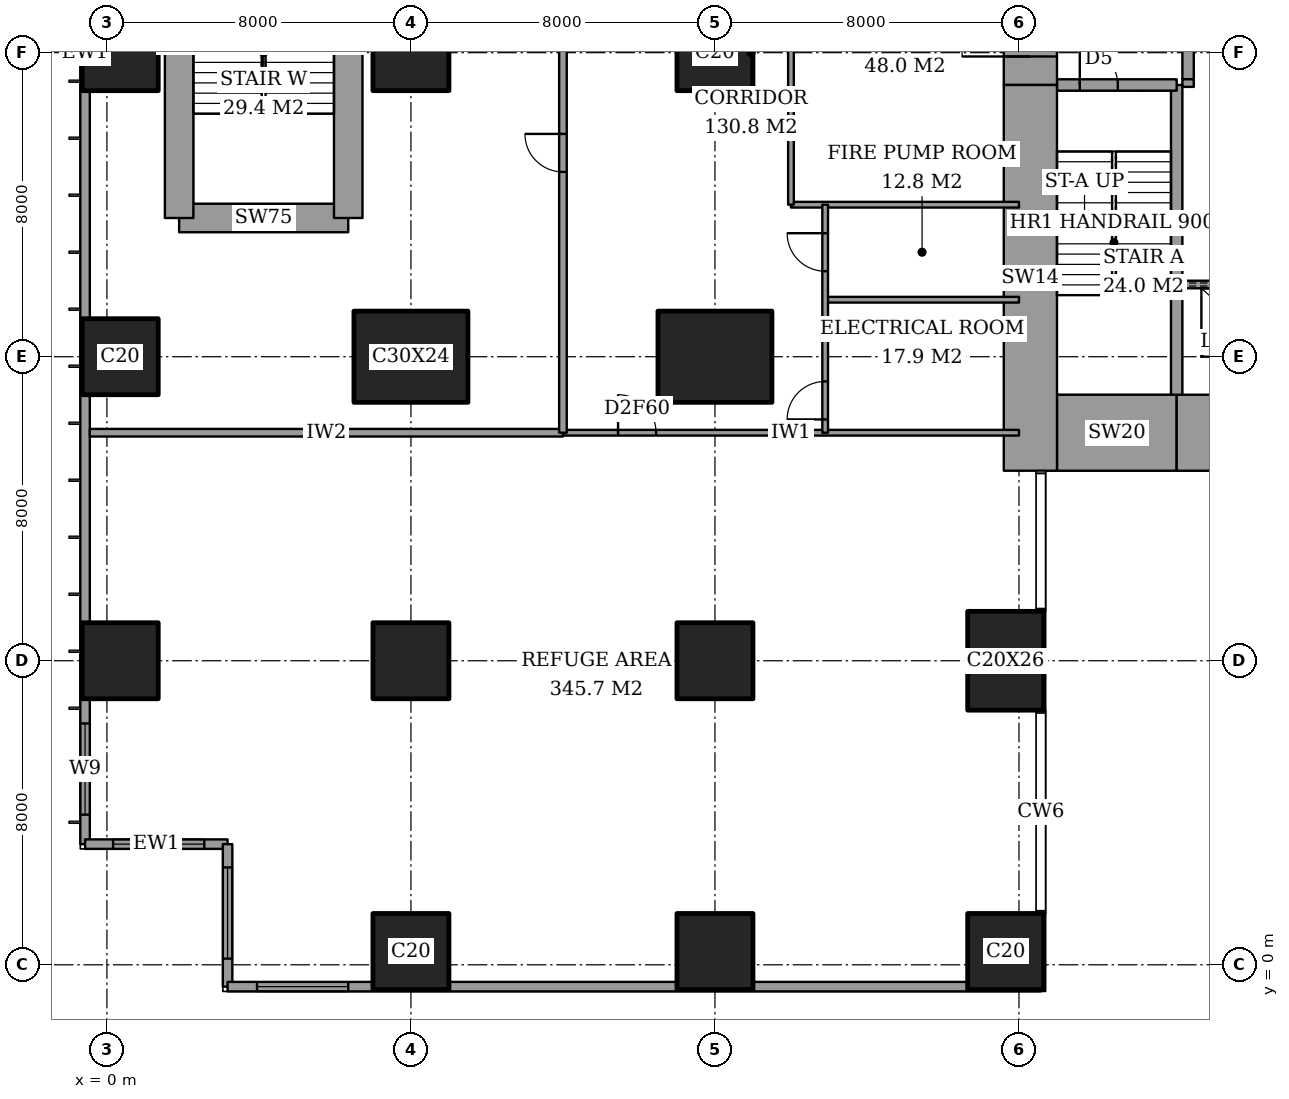
"""IFC4 building model, lengths in metres.
Left out: names, types, materials, properties, quantities, classifications, styles, units other than length and angle.
Written with IfcOpenShell. Run it as: python <this file> out.ifc"""

import sys

from ifc_helpers import new_model, si_unit, direction, frame, frame_2d, origin, origin_2d, place, context, subcontext, project, spatial, rectangle, extrude, element, fill, save


model = new_model("IFC4")
c1 = context("Model", 3, precision=1e-05, world=origin(), true_north=direction((0.0, 1.0)))
c2 = subcontext(c1, "Body", "Model", "MODEL_VIEW")
j1 = project(units=[si_unit("LENGTHUNIT", "METRE"), si_unit("PLANEANGLEUNIT", "RADIAN")], contexts=[c1])
p1 = place(None, origin())
s1 = spatial("IfcSite", under=j1, at=p1, CompositionType="ELEMENT")
p2 = place(p1, origin())
s2 = spatial("IfcBuilding", under=s1, at=p2, CompositionType="ELEMENT")
p3 = place(p2, frame((0.0, 0.0, 90.8)))
s3 = spatial("IfcBuildingStorey", under=s2, at=p3, CompositionType="ELEMENT", Elevation=90.8)
for number, where, z_axis, x_axis in (
    (1, (0.35, 8.0, 0.0), (0.0, 0.0, 1.0), (1.0, 0.0, 0.0)),
    (2, (0.35, 16.0, 0.0), (0.0, 0.0, 1.0), (1.0, 0.0, 0.0)),
    (3, (0.35, 24.0, 0.0), (0.0, 0.0, 1.0), (1.0, 0.0, 0.0)),
    (4, (8.0, 0.35, 0.0), (0.0, 0.0, 1.0), (1.0, 0.0, 0.0)),
    (5, (8.0, 8.0, 0.0), (0.0, 0.0, 1.0), (1.0, 0.0, 0.0)),
):
    element("IfcColumn", number, at=place(p3, frame(where, z_axis=z_axis, x_axis=x_axis)), inside=s3, PredefinedType="COLUMN", context=c2, shape_type="SweptSolid", body=[
        extrude(rectangle(XDim=2.0, YDim=2.0, at=origin_2d()), origin(), (0.0, 0.0, 1.0), 5.4),
    ])
p4 = place(p3, frame((8.0, 16.0, 0.0), z_axis=(0.0, 0.0, 1.0), x_axis=(1.0, 0.0, 0.0)))
e6 = element("IfcColumn", 6, at=p4, inside=s3, PredefinedType="COLUMN", context=c2, shape_type="SweptSolid", body=[
    extrude(rectangle(XDim=3.0, YDim=2.4, at=origin_2d()), origin(), (0.0, 0.0, 1.0), 5.4),
])
for number, where, z_axis, x_axis in (
    (7, (8.0, 24.0, 0.0), (0.0, 0.0, 1.0), (1.0, 0.0, 0.0)),
    (8, (16.0, 0.35, 0.0), (0.0, 0.0, 1.0), (1.0, 0.0, 0.0)),
    (9, (16.0, 8.0, 0.0), (0.0, 0.0, 1.0), (1.0, 0.0, 0.0)),
):
    element("IfcColumn", number, at=place(p3, frame(where, z_axis=z_axis, x_axis=x_axis)), inside=s3, PredefinedType="COLUMN", context=c2, shape_type="SweptSolid", body=[
        extrude(rectangle(XDim=2.0, YDim=2.0, at=origin_2d()), origin(), (0.0, 0.0, 1.0), 5.4),
    ])
p5 = place(p3, frame((16.0, 16.0, 0.0), z_axis=(0.0, 0.0, 1.0), x_axis=(1.0, 0.0, 0.0)))
e10 = element("IfcColumn", 10, at=p5, inside=s3, PredefinedType="COLUMN", context=c2, shape_type="SweptSolid", body=[
    extrude(rectangle(XDim=3.0, YDim=2.4, at=origin_2d()), origin(), (0.0, 0.0, 1.0), 5.4),
])
for number, where, z_axis, x_axis in (
    (11, (16.0, 24.0, 0.0), (0.0, 0.0, 1.0), (1.0, 0.0, 0.0)),
    (12, (23.65, 0.35, 0.0), (0.0, 0.0, 1.0), (1.0, 0.0, 0.0)),
):
    element("IfcColumn", number, at=place(p3, frame(where, z_axis=z_axis, x_axis=x_axis)), inside=s3, PredefinedType="COLUMN", context=c2, shape_type="SweptSolid", body=[
        extrude(rectangle(XDim=2.0, YDim=2.0, at=origin_2d()), origin(), (0.0, 0.0, 1.0), 5.4),
    ])
p6 = place(p3, frame((23.65, 8.0, 0.0), z_axis=(0.0, 0.0, 1.0), x_axis=(1.0, 0.0, 0.0)))
e13 = element("IfcColumn", 13, at=p6, inside=s3, PredefinedType="COLUMN", context=c2, shape_type="SweptSolid", body=[
    extrude(rectangle(XDim=2.0, YDim=2.6, at=origin_2d()), origin(), (0.0, 0.0, 1.0), 5.4),
])
p7 = place(p3, frame((25.0, 14.0, 0.0), z_axis=(0.0, 0.0, 1.0), x_axis=(1.0, 0.0, 0.0)))
e14 = element("IfcWall", 14, at=p7, inside=s3, PredefinedType="SHEAR", context=c2, shape_type="SweptSolid", body=[
    extrude(rectangle(XDim=3.15, YDim=2.0, at=frame_2d((1.575, 0.0))), origin(), (0.0, 0.0, 1.0), 5.4),
])
p8 = place(p3, frame((28.15, 14.0, 0.0), z_axis=(0.0, 0.0, 1.0), x_axis=(1.0, 0.0, 0.0)))
e15 = element("IfcWall", 15, at=p8, inside=s3, PredefinedType="SHEAR", context=c2, shape_type="SweptSolid", body=[
    extrude(rectangle(XDim=9.7, YDim=2.0, at=frame_2d((4.85, 0.0))), origin(), (0.0, 0.0, 1.0), 5.4),
])
p9 = place(p3, frame((24.3, 13.0, 0.0), z_axis=(0.0, 0.0, 1.0), x_axis=(0.0, 1.0, 0.0)))
e16 = element("IfcWall", 16, at=p9, inside=s3, PredefinedType="SHEAR", context=c2, shape_type="SweptSolid", body=[
    extrude(rectangle(XDim=10.15, YDim=1.4, at=frame_2d((5.075, 0.0))), origin(), (0.0, 0.0, 1.0), 5.4),
])
p10 = place(p3, frame((24.3, 23.15, 0.0), z_axis=(0.0, 0.0, 1.0), x_axis=(0.0, 1.0, 0.0)))
e17 = element("IfcWall", 17, at=p10, inside=s3, PredefinedType="SHEAR", context=c2, shape_type="SweptSolid", body=[
    extrude(rectangle(XDim=11.85, YDim=1.4, at=frame_2d((5.925, 0.0))), origin(), (0.0, 0.0, 1.0), 5.4),
])
p11 = place(p10, frame((0.75, 0.0, 0.0)))
e18 = element("IfcOpeningElement", 18, at=p11, cuts=e17, PredefinedType="OPENING", context=c2, shape_type="SweptSolid", body=[
    extrude(rectangle(XDim=1.8, YDim=2.4, at=frame_2d((0.9, 1.2))), frame((0.0, 0.71, 0.0), z_axis=(0.0, -1.0, 0.0), x_axis=(1.0, 0.0, 0.0)), (0.0, 0.0, 1.0), 1.42),
])
p12 = place(p3, frame((28.15, 15.0, 0.0), z_axis=(0.0, 0.0, 1.0), x_axis=(0.0, 1.0, 0.0)))
e19 = element("IfcWall", 19, at=p12, inside=s3, PredefinedType="SHEAR", context=c2, shape_type="SweptSolid", body=[
    extrude(rectangle(XDim=8.15, YDim=0.3, at=frame_2d((4.075, 0.0))), origin(), (0.0, 0.0, 1.0), 5.4),
])
p13 = place(p3, frame((25.0, 23.15, 0.0), z_axis=(0.0, 0.0, 1.0), x_axis=(1.0, 0.0, 0.0)))
e20 = element("IfcWall", 20, at=p13, inside=s3, PredefinedType="SHEAR", context=c2, shape_type="SweptSolid", body=[
    extrude(rectangle(XDim=3.15, YDim=0.3, at=frame_2d((1.575, 0.0))), origin(), (0.0, 0.0, 1.0), 5.4),
])
p14 = place(p13, frame((0.6, 0.0, 0.0)))
e21 = element("IfcOpeningElement", 21, at=p14, cuts=e20, PredefinedType="OPENING", context=c2, shape_type="SweptSolid", body=[
    extrude(rectangle(XDim=1.0, YDim=2.1, at=frame_2d((0.5, 1.05))), frame((0.0, 0.16, 0.0), z_axis=(0.0, -1.0, 0.0), x_axis=(1.0, 0.0, 0.0)), (0.0, 0.0, 1.0), 0.32),
])
p15 = place(p3, frame((28.45, 23.3, 0.0), z_axis=(0.0, 0.0, 1.0), x_axis=(0.0, 1.0, 0.0)))
e22 = element("IfcWall", 22, at=p15, inside=s3, PredefinedType="PARTITIONING", context=c2, shape_type="SweptSolid", body=[
    extrude(rectangle(XDim=6.7, YDim=0.3, at=frame_2d((3.35, 0.0))), origin(), (0.0, 0.0, 1.0), 5.4),
])
p16 = place(p15, frame((2.7, 0.0, 0.0)))
e23 = element("IfcOpeningElement", 23, at=p16, cuts=e22, PredefinedType="OPENING", context=c2, shape_type="SweptSolid", body=[
    extrude(rectangle(XDim=1.2, YDim=2.1, at=frame_2d((0.6, 1.05))), frame((0.0, 0.16, 0.0), z_axis=(0.0, -1.0, 0.0), x_axis=(1.0, 0.0, 0.0)), (0.0, 0.0, 1.0), 0.32),
])
p17 = place(p3, frame((1.9, 19.65, 0.0), z_axis=(0.0, 0.0, 1.0), x_axis=(1.0, 0.0, 0.0)))
e24 = element("IfcWall", 24, at=p17, inside=s3, PredefinedType="SHEAR", context=c2, shape_type="SweptSolid", body=[
    extrude(rectangle(XDim=4.45, YDim=0.75, at=frame_2d((2.225, 0.0))), origin(), (0.0, 0.0, 1.0), 5.4),
])
for number, where, z_axis, x_axis in (
    (25, (6.35, 19.65, 0.0), (0.0, 0.0, 1.0), (0.0, 1.0, 0.0)),
    (26, (1.9, 28.35, 0.0), (0.0, 0.0, 1.0), (0.0, -1.0, 0.0)),
):
    element("IfcWall", number, at=place(p3, frame(where, z_axis=z_axis, x_axis=x_axis)), inside=s3, PredefinedType="SHEAR", context=c2, shape_type="SweptSolid", body=[
        extrude(rectangle(XDim=8.7, YDim=0.75, at=frame_2d((4.35, 0.0))), origin(), (0.0, 0.0, 1.0), 5.4),
    ])
p18 = place(p3, frame((-0.575, 44.825, 0.0), z_axis=(0.0, 0.0, 1.0), x_axis=(0.0, -1.0, 0.0)))
e27 = element("IfcWall", 27, at=p18, inside=s3, PredefinedType="SOLIDWALL", context=c2, shape_type="SweptSolid", body=[
    extrude(rectangle(XDim=41.65, YDim=0.25, at=frame_2d((20.825, 0.0))), origin(), (0.0, 0.0, 1.0), 5.4),
])
p19 = place(p18, frame((0.775, 0.0, 0.9)))
e28 = element("IfcOpeningElement", 28, at=p19, cuts=e27, PredefinedType="OPENING", context=c2, shape_type="SweptSolid", body=[
    extrude(rectangle(XDim=2.4, YDim=2.4, at=frame_2d((1.2, 1.2))), frame((0.0, 0.135, 0.0), z_axis=(0.0, -1.0, 0.0), x_axis=(1.0, 0.0, 0.0)), (0.0, 0.0, 1.0), 0.27),
])
p20 = place(p18, frame((38.475, 0.0, 0.9)))
e29 = element("IfcOpeningElement", 29, at=p20, cuts=e27, PredefinedType="OPENING", context=c2, shape_type="SweptSolid", body=[
    extrude(rectangle(XDim=2.4, YDim=2.4, at=frame_2d((1.2, 1.2))), frame((0.0, 0.135, 0.0), z_axis=(0.0, -1.0, 0.0), x_axis=(1.0, 0.0, 0.0)), (0.0, 0.0, 1.0), 0.27),
])
p21 = place(p3, frame((-0.575, 3.175, 0.0), z_axis=(0.0, 0.0, 1.0), x_axis=(1.0, 0.0, 0.0)))
e30 = element("IfcWall", 30, at=p21, inside=s3, PredefinedType="SOLIDWALL", context=c2, shape_type="SweptSolid", body=[
    extrude(rectangle(XDim=3.75, YDim=0.25, at=frame_2d((1.875, 0.0))), origin(), (0.0, 0.0, 1.0), 5.4),
])
p22 = place(p21, frame((0.738, 0.0, 0.9)))
e31 = element("IfcOpeningElement", 31, at=p22, cuts=e30, PredefinedType="OPENING", context=c2, shape_type="SweptSolid", body=[
    extrude(rectangle(XDim=2.4, YDim=2.4, at=frame_2d((1.2, 1.2))), frame((0.0, 0.135, 0.0), z_axis=(0.0, -1.0, 0.0), x_axis=(1.0, 0.0, 0.0)), (0.0, 0.0, 1.0), 0.27),
])
p23 = place(p3, frame((3.175, 3.175, 0.0), z_axis=(0.0, 0.0, 1.0), x_axis=(0.0, -1.0, 0.0)))
e32 = element("IfcWall", 32, at=p23, inside=s3, PredefinedType="SOLIDWALL", context=c2, shape_type="SweptSolid", body=[
    extrude(rectangle(XDim=3.75, YDim=0.25, at=frame_2d((1.875, 0.0))), origin(), (0.0, 0.0, 1.0), 5.4),
])
p24 = place(p23, frame((0.613, 0.0, 0.9)))
e33 = element("IfcOpeningElement", 33, at=p24, cuts=e32, PredefinedType="OPENING", context=c2, shape_type="SweptSolid", body=[
    extrude(rectangle(XDim=2.4, YDim=2.4, at=frame_2d((1.2, 1.2))), frame((0.0, 0.135, 0.0), z_axis=(0.0, -1.0, 0.0), x_axis=(1.0, 0.0, 0.0)), (0.0, 0.0, 1.0), 0.27),
])
p25 = place(p3, frame((3.175, -0.575, 0.0), z_axis=(0.0, 0.0, 1.0), x_axis=(1.0, 0.0, 0.0)))
e34 = element("IfcWall", 34, at=p25, inside=s3, PredefinedType="SOLIDWALL", context=c2, shape_type="SweptSolid", body=[
    extrude(rectangle(XDim=21.4, YDim=0.25, at=frame_2d((10.7, 0.0))), origin(), (0.0, 0.0, 1.0), 5.4),
])
p26 = place(p25, frame((0.775, 0.0, 0.9)))
e35 = element("IfcOpeningElement", 35, at=p26, cuts=e34, PredefinedType="OPENING", context=c2, shape_type="SweptSolid", body=[
    extrude(rectangle(XDim=2.4, YDim=2.4, at=frame_2d((1.2, 1.2))), frame((0.0, 0.135, 0.0), z_axis=(0.0, -1.0, 0.0), x_axis=(1.0, 0.0, 0.0)), (0.0, 0.0, 1.0), 0.27),
])
p27 = place(p3, frame((-0.45, 14.0, 0.0), z_axis=(0.0, 0.0, 1.0), x_axis=(1.0, 0.0, 0.0)))
e36 = element("IfcWall", 36, at=p27, inside=s3, PredefinedType="PARTITIONING", context=c2, shape_type="SweptSolid", body=[
    extrude(rectangle(XDim=12.45, YDim=0.2, at=frame_2d((6.225, 0.0))), origin(), (0.0, 0.0, 1.0), 5.15),
])
p28 = place(p3, frame((12.0, 14.0, 0.0), z_axis=(0.0, 0.0, 1.0), x_axis=(1.0, 0.0, 0.0)))
e37 = element("IfcWall", 37, at=p28, inside=s3, PredefinedType="PARTITIONING", context=c2, shape_type="SweptSolid", body=[
    extrude(rectangle(XDim=12.0, YDim=0.15, at=frame_2d((6.0, 0.0))), origin(), (0.0, 0.0, 1.0), 5.15),
])
p29 = place(p28, frame((1.45, 0.0, 0.0)))
e38 = element("IfcOpeningElement", 38, at=p29, cuts=e37, PredefinedType="OPENING", context=c2, shape_type="SweptSolid", body=[
    extrude(rectangle(XDim=1.0, YDim=2.1, at=frame_2d((0.5, 1.05))), frame((0.0, 0.085, 0.0), z_axis=(0.0, -1.0, 0.0), x_axis=(1.0, 0.0, 0.0)), (0.0, 0.0, 1.0), 0.17),
])
p30 = place(p3, frame((18.9, 17.5, 0.0), z_axis=(0.0, 0.0, 1.0), x_axis=(1.0, 0.0, 0.0)))
e39 = element("IfcWall", 39, at=p30, inside=s3, PredefinedType="PARTITIONING", context=c2, shape_type="SweptSolid", body=[
    extrude(rectangle(XDim=5.1, YDim=0.15, at=frame_2d((2.55, 0.0))), origin(), (0.0, 0.0, 1.0), 5.15),
])
p31 = place(p3, frame((18.0, 20.0, 0.0), z_axis=(0.0, 0.0, 1.0), x_axis=(1.0, 0.0, 0.0)))
e40 = element("IfcWall", 40, at=p31, inside=s3, PredefinedType="PARTITIONING", context=c2, shape_type="SweptSolid", body=[
    extrude(rectangle(XDim=6.0, YDim=0.15, at=frame_2d((3.0, 0.0))), origin(), (0.0, 0.0, 1.0), 5.15),
])
p32 = place(p3, frame((12.0, 14.0, 0.0), z_axis=(0.0, 0.0, 1.0), x_axis=(0.0, 1.0, 0.0)))
e41 = element("IfcWall", 41, at=p32, inside=s3, PredefinedType="PARTITIONING", context=c2, shape_type="SweptSolid", body=[
    extrude(rectangle(XDim=14.725, YDim=0.2, at=frame_2d((7.363, 0.0))), origin(), (0.0, 0.0, 1.0), 5.15),
])
p33 = place(p32, frame((6.863, 0.0, 0.0)))
e42 = element("IfcOpeningElement", 42, at=p33, cuts=e41, PredefinedType="OPENING", context=c2, shape_type="SweptSolid", body=[
    extrude(rectangle(XDim=1.0, YDim=2.1, at=frame_2d((0.5, 1.05))), frame((0.0, 0.11, 0.0), z_axis=(0.0, -1.0, 0.0), x_axis=(1.0, 0.0, 0.0)), (0.0, 0.0, 1.0), 0.22),
])
p34 = place(p3, frame((18.0, 20.0, 0.0), z_axis=(0.0, 0.0, 1.0), x_axis=(0.0, 1.0, 0.0)))
e43 = element("IfcWall", 43, at=p34, inside=s3, PredefinedType="PARTITIONING", context=c2, shape_type="SweptSolid", body=[
    extrude(rectangle(XDim=8.0, YDim=0.15, at=frame_2d((4.0, 0.0))), origin(), (0.0, 0.0, 1.0), 5.15),
])
p35 = place(p34, frame((4.8, 0.0, 0.0)))
e44 = element("IfcOpeningElement", 44, at=p35, cuts=e43, PredefinedType="OPENING", context=c2, shape_type="SweptSolid", body=[
    extrude(rectangle(XDim=1.0, YDim=2.1, at=frame_2d((0.5, 1.05))), frame((0.0, 0.085, 0.0), z_axis=(0.0, -1.0, 0.0), x_axis=(1.0, 0.0, 0.0)), (0.0, 0.0, 1.0), 0.17),
])
p36 = place(p3, frame((18.9, 14.0, 0.0), z_axis=(0.0, 0.0, 1.0), x_axis=(0.0, 1.0, 0.0)))
e45 = element("IfcWall", 45, at=p36, inside=s3, PredefinedType="PARTITIONING", context=c2, shape_type="SweptSolid", body=[
    extrude(rectangle(XDim=6.0, YDim=0.15, at=frame_2d((3.0, 0.0))), origin(), (0.0, 0.0, 1.0), 5.15),
])
p37 = place(p36, frame((0.35, 0.0, 0.0)))
e46 = element("IfcOpeningElement", 46, at=p37, cuts=e45, PredefinedType="OPENING", context=c2, shape_type="SweptSolid", body=[
    extrude(rectangle(XDim=1.0, YDim=2.1, at=frame_2d((0.5, 1.05))), frame((0.0, 0.085, 0.0), z_axis=(0.0, -1.0, 0.0), x_axis=(1.0, 0.0, 0.0)), (0.0, 0.0, 1.0), 0.17),
])
p38 = place(p36, frame((4.25, 0.0, 0.0)))
e47 = element("IfcOpeningElement", 47, at=p38, cuts=e45, PredefinedType="OPENING", context=c2, shape_type="SweptSolid", body=[
    extrude(rectangle(XDim=1.0, YDim=2.1, at=frame_2d((0.5, 1.05))), frame((0.0, 0.085, 0.0), z_axis=(0.0, -1.0, 0.0), x_axis=(1.0, 0.0, 0.0)), (0.0, 0.0, 1.0), 0.17),
])
p39 = place(p3, frame((28.3, 17.9, 0.0), z_axis=(0.0, 0.0, 1.0), x_axis=(1.0, 0.0, 0.0)))
e48 = element("IfcWall", 48, at=p39, inside=s3, PredefinedType="PARTITIONING", context=c2, shape_type="SweptSolid", body=[
    extrude(rectangle(XDim=12.7, YDim=0.2, at=frame_2d((6.35, 0.0))), origin(), (0.0, 0.0, 1.0), 5.4),
])
p40 = place(p39, frame((0.95, 0.0, 0.0)))
e49 = element("IfcOpeningElement", 49, at=p40, cuts=e48, PredefinedType="OPENING", context=c2, shape_type="SweptSolid", body=[
    extrude(rectangle(XDim=1.1, YDim=2.1, at=frame_2d((0.55, 1.05))), frame((0.0, 0.11, 0.0), z_axis=(0.0, -1.0, 0.0), x_axis=(1.0, 0.0, 0.0)), (0.0, 0.0, 1.0), 0.22),
])
p41 = place(p39, frame((4.15, 0.0, 0.0)))
e50 = element("IfcOpeningElement", 50, at=p41, cuts=e48, PredefinedType="OPENING", context=c2, shape_type="SweptSolid", body=[
    extrude(rectangle(XDim=1.1, YDim=2.1, at=frame_2d((0.55, 1.05))), frame((0.0, 0.11, 0.0), z_axis=(0.0, -1.0, 0.0), x_axis=(1.0, 0.0, 0.0)), (0.0, 0.0, 1.0), 0.22),
])
p42 = place(p39, frame((7.35, 0.0, 0.0)))
e51 = element("IfcOpeningElement", 51, at=p42, cuts=e48, PredefinedType="OPENING", context=c2, shape_type="SweptSolid", body=[
    extrude(rectangle(XDim=1.1, YDim=2.1, at=frame_2d((0.55, 1.05))), frame((0.0, 0.11, 0.0), z_axis=(0.0, -1.0, 0.0), x_axis=(1.0, 0.0, 0.0)), (0.0, 0.0, 1.0), 0.22),
])
p43 = place(p39, frame((10.6, 0.0, 0.0)))
e52 = element("IfcOpeningElement", 52, at=p43, cuts=e48, PredefinedType="OPENING", context=c2, shape_type="SweptSolid", body=[
    extrude(rectangle(XDim=1.2, YDim=2.1, at=frame_2d((0.6, 1.05))), frame((0.0, 0.11, 0.0), z_axis=(0.0, -1.0, 0.0), x_axis=(1.0, 0.0, 0.0)), (0.0, 0.0, 1.0), 0.22),
])
p44 = place(p3, frame((28.3, 23.2, 0.0), z_axis=(0.0, 0.0, 1.0), x_axis=(1.0, 0.0, 0.0)))
e53 = element("IfcWall", 53, at=p44, inside=s3, PredefinedType="PARTITIONING", context=c2, shape_type="SweptSolid", body=[
    extrude(rectangle(XDim=0.3, YDim=0.2, at=frame_2d((0.15, 0.0))), origin(), (0.0, 0.0, 1.0), 5.4),
])
p45 = place(p20, origin())
e54 = element("IfcWindow", 54, at=p45, inside=s3, PartitioningType="SINGLE_PANEL", PredefinedType="WINDOW", context=c2, shape_type="SweptSolid", body=[
    extrude(rectangle(XDim=2.4, YDim=2.4, at=frame_2d((1.2, 1.2))), frame((0.0, 0.03, 0.0), z_axis=(0.0, -1.0, 0.0), x_axis=(1.0, 0.0, 0.0)), (0.0, 0.0, 1.0), 0.06),
])
fill(e29, e54)
p46 = place(p22, origin())
e55 = element("IfcWindow", 55, at=p46, inside=s3, PartitioningType="SINGLE_PANEL", PredefinedType="WINDOW", context=c2, shape_type="SweptSolid", body=[
    extrude(rectangle(XDim=2.4, YDim=2.4, at=frame_2d((1.2, 1.2))), frame((0.0, 0.03, 0.0), z_axis=(0.0, -1.0, 0.0), x_axis=(1.0, 0.0, 0.0)), (0.0, 0.0, 1.0), 0.06),
])
fill(e31, e55)
p47 = place(p24, origin())
e56 = element("IfcWindow", 56, at=p47, inside=s3, PartitioningType="SINGLE_PANEL", PredefinedType="WINDOW", context=c2, shape_type="SweptSolid", body=[
    extrude(rectangle(XDim=2.4, YDim=2.4, at=frame_2d((1.2, 1.2))), frame((0.0, 0.03, 0.0), z_axis=(0.0, -1.0, 0.0), x_axis=(1.0, 0.0, 0.0)), (0.0, 0.0, 1.0), 0.06),
])
fill(e33, e56)
p48 = place(p26, origin())
e57 = element("IfcWindow", 57, at=p48, inside=s3, PartitioningType="SINGLE_PANEL", PredefinedType="WINDOW", context=c2, shape_type="SweptSolid", body=[
    extrude(rectangle(XDim=2.4, YDim=2.4, at=frame_2d((1.2, 1.2))), frame((0.0, 0.03, 0.0), z_axis=(0.0, -1.0, 0.0), x_axis=(1.0, 0.0, 0.0)), (0.0, 0.0, 1.0), 0.06),
])
fill(e35, e57)
p49 = place(p29, origin())
e58 = element("IfcDoor", 58, at=p49, inside=s3, OperationType="SINGLE_SWING_RIGHT", PredefinedType="DOOR", context=c2, shape_type="SweptSolid", body=[
    extrude(rectangle(XDim=1.0, YDim=2.1, at=frame_2d((0.5, 1.05))), frame((0.0, 0.025, 0.0), z_axis=(0.0, -1.0, 0.0), x_axis=(1.0, 0.0, 0.0)), (0.0, 0.0, 1.0), 0.05),
])
fill(e38, e58)
p50 = place(p33, origin())
e59 = element("IfcDoor", 59, at=p50, inside=s3, OperationType="SINGLE_SWING_LEFT", PredefinedType="DOOR", context=c2, shape_type="SweptSolid", body=[
    extrude(rectangle(XDim=1.0, YDim=2.1, at=frame_2d((0.5, 1.05))), frame((0.0, 0.025, 0.0), z_axis=(0.0, -1.0, 0.0), x_axis=(1.0, 0.0, 0.0)), (0.0, 0.0, 1.0), 0.05),
])
fill(e42, e59)
p51 = place(p37, origin())
e60 = element("IfcDoor", 60, at=p51, inside=s3, OperationType="SINGLE_SWING_RIGHT", PredefinedType="DOOR", context=c2, shape_type="SweptSolid", body=[
    extrude(rectangle(XDim=1.0, YDim=2.1, at=frame_2d((0.5, 1.05))), frame((0.0, 0.025, 0.0), z_axis=(0.0, -1.0, 0.0), x_axis=(1.0, 0.0, 0.0)), (0.0, 0.0, 1.0), 0.05),
])
fill(e46, e60)
p52 = place(p38, origin())
e61 = element("IfcDoor", 61, at=p52, inside=s3, OperationType="SINGLE_SWING_LEFT", PredefinedType="DOOR", context=c2, shape_type="SweptSolid", body=[
    extrude(rectangle(XDim=1.0, YDim=2.1, at=frame_2d((0.5, 1.05))), frame((0.0, 0.025, 0.0), z_axis=(0.0, -1.0, 0.0), x_axis=(1.0, 0.0, 0.0)), (0.0, 0.0, 1.0), 0.05),
])
fill(e47, e61)
p53 = place(p14, origin())
e62 = element("IfcDoor", 62, at=p53, inside=s3, OperationType="SINGLE_SWING_RIGHT", PredefinedType="DOOR", context=c2, shape_type="SweptSolid", body=[
    extrude(rectangle(XDim=1.0, YDim=2.1, at=frame_2d((0.5, 1.05))), frame((0.0, 0.025, 0.0), z_axis=(0.0, -1.0, 0.0), x_axis=(1.0, 0.0, 0.0)), (0.0, 0.0, 1.0), 0.05),
])
fill(e21, e62)
p54 = place(p11, origin())
e63 = element("IfcDoor", 63, at=p54, inside=s3, OperationType="DOUBLE_DOOR_DOUBLE_SWING", PredefinedType="DOOR", context=c2, shape_type="SweptSolid", body=[
    extrude(rectangle(XDim=1.8, YDim=2.4, at=frame_2d((0.9, 1.2))), frame((0.0, 0.025, 0.0), z_axis=(0.0, -1.0, 0.0), x_axis=(1.0, 0.0, 0.0)), (0.0, 0.0, 1.0), 0.05),
])
fill(e18, e63)
save(model, sys.argv[1])
